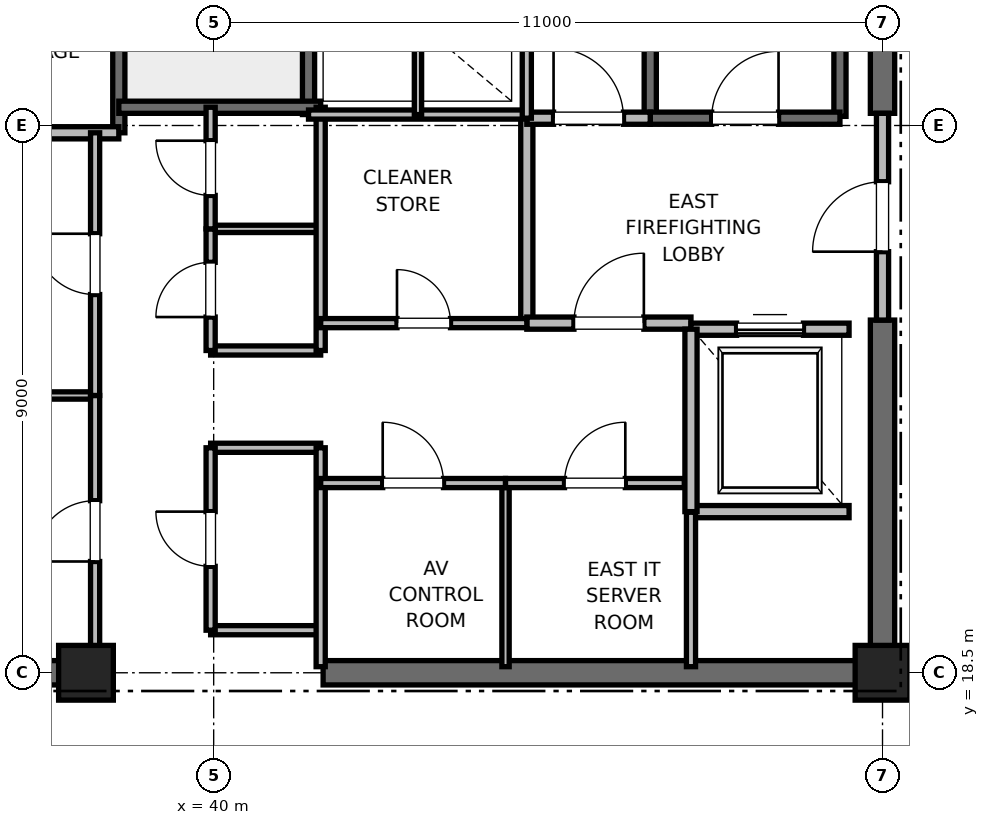
"""IFC4 building model, lengths in metres.
Left out: names, types, materials, properties, quantities, classifications, styles, units other than length and angle.
Written with IfcOpenShell. Run it as: python <this file> out.ifc"""

import sys

from ifc_helpers import new_model, si_unit, direction, frame, frame_2d, origin, origin_2d, place, context, subcontext, project, spatial, rectangle, extrude, element, fill, save


model = new_model("IFC4")
c1 = context("Model", 3, precision=1e-05, world=origin(), true_north=direction((0.0, 1.0)))
c2 = subcontext(c1, "Body", "Model", "MODEL_VIEW")
j1 = project(units=[si_unit("LENGTHUNIT", "METRE"), si_unit("PLANEANGLEUNIT", "RADIAN")], contexts=[c1])
p1 = place(None, origin())
s1 = spatial("IfcSite", under=j1, at=p1, CompositionType="ELEMENT")
p2 = place(p1, origin())
s2 = spatial("IfcBuilding", under=s1, at=p2, CompositionType="ELEMENT")
p3 = place(p2, frame((0.0, 0.0, 326.8)))
s3 = spatial("IfcBuildingStorey", under=s2, at=p3, CompositionType="ELEMENT", Elevation=326.8)
for number, where, z_axis, x_axis in (
    (1, (51.0, 18.5, 0.0), (0.0, 0.0, 1.0), (1.0, 0.0, 0.0)),
    (2, (37.9, 18.5, 0.0), (0.0, 0.0, 1.0), (1.0, 0.0, 0.0)),
):
    element("IfcColumn", number, at=place(p3, frame(where, z_axis=z_axis, x_axis=x_axis)), inside=s3, PredefinedType="PILASTER", context=c2, shape_type="SweptSolid", body=[
        extrude(rectangle(XDim=0.9, YDim=0.9, at=origin_2d()), origin(), (0.0, 0.0, 1.0), 4.0),
    ])
for number, where, z_axis, x_axis in (
    (3, (29.0, 18.5, 0.0), (0.0, 0.0, 1.0), (1.0, 0.0, 0.0)),
    (4, (41.8, 18.5, 0.0), (0.0, 0.0, 1.0), (1.0, 0.0, 0.0)),
):
    element("IfcWall", number, at=place(p3, frame(where, z_axis=z_axis, x_axis=x_axis)), inside=s3, PredefinedType="SHEAR", context=c2, shape_type="SweptSolid", body=[
        extrude(rectangle(XDim=9.2, YDim=0.4, at=frame_2d((4.6, 0.0))), origin(), (0.0, 0.0, 1.0), 3.785),
    ])
p4 = place(p3, frame((51.0, 18.5, 0.0), z_axis=(0.0, 0.0, 1.0), x_axis=(0.0, 1.0, 0.0)))
e5 = element("IfcWall", 5, at=p4, inside=s3, PredefinedType="SHEAR", context=c2, shape_type="SweptSolid", body=[
    extrude(rectangle(XDim=5.8, YDim=0.4, at=frame_2d((2.9, 0.0))), origin(), (0.0, 0.0, 1.0), 3.785),
])
p5 = place(p3, frame((51.0, 27.7, 0.0), z_axis=(0.0, 0.0, 1.0), x_axis=(0.0, 1.0, 0.0)))
e6 = element("IfcWall", 6, at=p5, inside=s3, PredefinedType="SHEAR", context=c2, shape_type="SweptSolid", body=[
    extrude(rectangle(XDim=8.8, YDim=0.4, at=frame_2d((4.4, 0.0))), origin(), (0.0, 0.0, 1.0), 3.785),
])
p6 = place(p3, frame((50.3, 27.65, 0.0), z_axis=(0.0, 0.0, 1.0), x_axis=(0.0, 1.0, 0.0)))
e7 = element("IfcWall", 7, at=p6, inside=s3, PredefinedType="SOLIDWALL", context=c2, shape_type="SweptSolid", body=[
    extrude(rectangle(XDim=8.15, YDim=0.2, at=frame_2d((4.075, 0.0))), origin(), (0.0, 0.0, 1.0), 3.785),
])
p7 = place(p3, frame((47.18, 27.62, 0.0), z_axis=(0.0, 0.0, 1.0), x_axis=(0.0, 1.0, 0.0)))
e8 = element("IfcWall", 8, at=p7, inside=s3, PredefinedType="SOLIDWALL", context=c2, shape_type="SweptSolid", body=[
    extrude(rectangle(XDim=8.18, YDim=0.2, at=frame_2d((4.09, 0.0))), origin(), (0.0, 0.0, 1.0), 3.785),
])
p8 = place(p3, frame((47.18, 27.62, 0.0), z_axis=(0.0, 0.0, 1.0), x_axis=(1.0, 0.0, 0.0)))
e9 = element("IfcWall", 9, at=p8, inside=s3, PredefinedType="SOLIDWALL", context=c2, shape_type="SweptSolid", body=[
    extrude(rectangle(XDim=3.12, YDim=0.2, at=frame_2d((1.56, 0.0))), origin(), (0.0, 0.0, 1.0), 3.785),
])
p9 = place(p8, frame((1.01, 0.0, 0.0)))
e10 = element("IfcOpeningElement", 10, at=p9, cuts=e9, PredefinedType="OPENING", context=c2, shape_type="SweptSolid", body=[
    extrude(rectangle(XDim=1.1, YDim=2.15, at=frame_2d((0.55, 1.075))), frame((0.0, 0.1, 0.0), z_axis=(0.0, -1.0, 0.0), x_axis=(1.0, 0.0, 0.0)), (0.0, 0.0, 1.0), 0.2),
])
p10 = place(p3, frame((38.44, 27.38, 0.0), z_axis=(0.0, 0.0, 1.0), x_axis=(0.0, 1.0, 0.0)))
e11 = element("IfcWall", 11, at=p10, inside=s3, PredefinedType="SOLIDWALL", context=c2, shape_type="SweptSolid", body=[
    extrude(rectangle(XDim=8.87, YDim=0.2, at=frame_2d((4.435, 0.0))), origin(), (0.0, 0.0, 1.0), 3.785),
])
p11 = place(p3, frame((41.56, 27.68, 0.0), z_axis=(0.0, 0.0, 1.0), x_axis=(0.0, 1.0, 0.0)))
e12 = element("IfcWall", 12, at=p11, inside=s3, PredefinedType="SOLIDWALL", context=c2, shape_type="SweptSolid", body=[
    extrude(rectangle(XDim=8.57, YDim=0.2, at=frame_2d((4.285, 0.0))), origin(), (0.0, 0.0, 1.0), 3.785),
])
p12 = place(p3, frame((38.44, 27.8, 0.0), z_axis=(0.0, 0.0, 1.0), x_axis=(1.0, 0.0, 0.0)))
e13 = element("IfcWall", 13, at=p12, inside=s3, PredefinedType="SOLIDWALL", context=c2, shape_type="SweptSolid", body=[
    extrude(rectangle(XDim=3.32, YDim=0.2, at=frame_2d((1.66, 0.0))), origin(), (0.0, 0.0, 1.0), 3.785),
])
p13 = place(p3, frame((32.82, 27.38, 0.0), z_axis=(0.0, 0.0, 1.0), x_axis=(1.0, 0.0, 0.0)))
e14 = element("IfcWall", 14, at=p13, inside=s3, PredefinedType="PARTITIONING", context=c2, shape_type="SweptSolid", body=[
    extrude(rectangle(XDim=5.62, YDim=0.2, at=frame_2d((2.81, 0.0))), origin(), (0.0, 0.0, 1.0), 3.785),
])
p14 = place(p3, frame((45.15, 24.25, 0.0), z_axis=(0.0, 0.0, 1.0), x_axis=(0.0, 1.0, 0.0)))
e15 = element("IfcWall", 15, at=p14, inside=s3, PredefinedType="PARTITIONING", context=c2, shape_type="SweptSolid", body=[
    extrude(rectangle(XDim=3.37, YDim=0.2, at=frame_2d((1.685, 0.0))), origin(), (0.0, 0.0, 1.0), 3.785),
])
p15 = place(p3, frame((45.15, 24.25, 0.0), z_axis=(0.0, 0.0, 1.0), x_axis=(1.0, 0.0, 0.0)))
e16 = element("IfcWall", 16, at=p15, inside=s3, PredefinedType="PARTITIONING", context=c2, shape_type="SweptSolid", body=[
    extrude(rectangle(XDim=2.7, YDim=0.2, at=frame_2d((1.35, 0.0))), origin(), (0.0, 0.0, 1.0), 3.785),
])
p16 = place(p15, frame((0.775, 0.0, 0.0)))
e17 = element("IfcOpeningElement", 17, at=p16, cuts=e16, PredefinedType="OPENING", context=c2, shape_type="SweptSolid", body=[
    extrude(rectangle(XDim=1.15, YDim=2.2, at=frame_2d((0.575, 1.1))), frame((0.0, 0.1, 0.0), z_axis=(0.0, -1.0, 0.0), x_axis=(1.0, 0.0, 0.0)), (0.0, 0.0, 1.0), 0.2),
])
p17 = place(p3, frame((45.15, 27.62, 0.0), z_axis=(0.0, 0.0, 1.0), x_axis=(1.0, 0.0, 0.0)))
e18 = element("IfcWall", 18, at=p17, inside=s3, PredefinedType="PARTITIONING", context=c2, shape_type="SweptSolid", body=[
    extrude(rectangle(XDim=2.03, YDim=0.2, at=frame_2d((1.015, 0.0))), origin(), (0.0, 0.0, 1.0), 3.785),
])
p18 = place(p17, frame((0.44, 0.0, 0.0)))
e19 = element("IfcOpeningElement", 19, at=p18, cuts=e18, PredefinedType="OPENING", context=c2, shape_type="SweptSolid", body=[
    extrude(rectangle(XDim=1.15, YDim=2.2, at=frame_2d((0.575, 1.1))), frame((0.0, 0.1, 0.0), z_axis=(0.0, -1.0, 0.0), x_axis=(1.0, 0.0, 0.0)), (0.0, 0.0, 1.0), 0.2),
])
p19 = place(p3, frame((51.0, 24.3, 0.0), z_axis=(0.0, 0.0, 1.0), x_axis=(0.0, 1.0, 0.0)))
e20 = element("IfcWall", 20, at=p19, inside=s3, PredefinedType="PARTITIONING", context=c2, shape_type="SweptSolid", body=[
    extrude(rectangle(XDim=3.4, YDim=0.2, at=frame_2d((1.7, 0.0))), origin(), (0.0, 0.0, 1.0), 2.865),
])
p20 = place(p19, frame((1.125, 0.0, 0.0)))
e21 = element("IfcOpeningElement", 21, at=p20, cuts=e20, PredefinedType="OPENING", context=c2, shape_type="SweptSolid", body=[
    extrude(rectangle(XDim=1.15, YDim=2.2, at=frame_2d((0.575, 1.1))), frame((0.0, 0.1, 0.0), z_axis=(0.0, -1.0, 0.0), x_axis=(1.0, 0.0, 0.0)), (0.0, 0.0, 1.0), 0.2),
])
p21 = place(p3, frame((47.85, 21.15, 0.0), z_axis=(0.0, 0.0, 1.0), x_axis=(1.0, 0.0, 0.0)))
e22 = element("IfcWall", 22, at=p21, inside=s3, PredefinedType="SOLIDWALL", context=c2, shape_type="SweptSolid", body=[
    extrude(rectangle(XDim=2.6, YDim=0.2, at=frame_2d((1.3, 0.0))), origin(), (0.0, 0.0, 1.0), 3.785),
])
p22 = place(p3, frame((50.45, 24.15, 0.0), z_axis=(0.0, 0.0, 1.0), x_axis=(-1.0, 0.0, 0.0)))
e23 = element("IfcWall", 23, at=p22, inside=s3, PredefinedType="SOLIDWALL", context=c2, shape_type="SweptSolid", body=[
    extrude(rectangle(XDim=2.6, YDim=0.2, at=frame_2d((1.3, 0.0))), origin(), (0.0, 0.0, 1.0), 2.865),
])
p23 = place(p22, frame((0.75, 0.0, 0.0)))
e24 = element("IfcOpeningElement", 24, at=p23, cuts=e23, PredefinedType="OPENING", context=c2, shape_type="SweptSolid", body=[
    extrude(rectangle(XDim=1.1, YDim=2.2, at=frame_2d((0.55, 1.1))), frame((0.0, 0.1, 0.0), z_axis=(0.0, -1.0, 0.0), x_axis=(1.0, 0.0, 0.0)), (0.0, 0.0, 1.0), 0.2),
])
p24 = place(p3, frame((47.85, 24.15, 0.0), z_axis=(0.0, 0.0, 1.0), x_axis=(0.0, -1.0, 0.0)))
e25 = element("IfcWall", 25, at=p24, inside=s3, PredefinedType="SOLIDWALL", context=c2, shape_type="SweptSolid", body=[
    extrude(rectangle(XDim=3.0, YDim=0.2, at=frame_2d((1.5, 0.0))), origin(), (0.0, 0.0, 1.0), 3.785),
])
for number, where, z_axis, x_axis in (
    (26, (39.95, 19.2, 0.0), (0.0, 0.0, 1.0), (1.0, 0.0, 0.0)),
    (27, (39.95, 22.2, 0.0), (0.0, 0.0, 1.0), (1.0, 0.0, 0.0)),
    (28, (39.95, 23.8, 0.0), (0.0, 0.0, 1.0), (1.0, 0.0, 0.0)),
):
    element("IfcWall", number, at=place(p3, frame(where, z_axis=z_axis, x_axis=x_axis)), inside=s3, PredefinedType="PARTITIONING", context=c2, shape_type="SweptSolid", body=[
        extrude(rectangle(XDim=1.81, YDim=0.15, at=frame_2d((0.905, 0.0))), origin(), (0.0, 0.0, 1.0), 2.85),
    ])
p25 = place(p3, frame((39.95, 25.8, 0.0), z_axis=(0.0, 0.0, 1.0), x_axis=(1.0, 0.0, 0.0)))
e29 = element("IfcWall", 29, at=p25, inside=s3, PredefinedType="PARTITIONING", context=c2, shape_type="SweptSolid", body=[
    extrude(rectangle(XDim=1.81, YDim=0.12, at=frame_2d((0.905, 0.0))), origin(), (0.0, 0.0, 1.0), 2.85),
])
p26 = place(p3, frame((41.76, 18.6, 0.0), z_axis=(0.0, 0.0, 1.0), x_axis=(0.0, 1.0, 0.0)))
e30 = element("IfcWall", 30, at=p26, inside=s3, PredefinedType="PARTITIONING", context=c2, shape_type="SweptSolid", body=[
    extrude(rectangle(XDim=3.6, YDim=0.15, at=frame_2d((1.8, 0.0))), origin(), (0.0, 0.0, 1.0), 2.85),
])
p27 = place(p3, frame((41.76, 23.8, 0.0), z_axis=(0.0, 0.0, 1.0), x_axis=(0.0, 1.0, 0.0)))
e31 = element("IfcWall", 31, at=p27, inside=s3, PredefinedType="PARTITIONING", context=c2, shape_type="SweptSolid", body=[
    extrude(rectangle(XDim=4.0, YDim=0.15, at=frame_2d((2.0, 0.0))), origin(), (0.0, 0.0, 1.0), 2.85),
])
p28 = place(p3, frame((39.95, 19.2, 0.0), z_axis=(0.0, 0.0, 1.0), x_axis=(0.0, 1.0, 0.0)))
e32 = element("IfcWall", 32, at=p28, inside=s3, PredefinedType="PARTITIONING", context=c2, shape_type="SweptSolid", body=[
    extrude(rectangle(XDim=3.0, YDim=0.15, at=frame_2d((1.5, 0.0))), origin(), (0.0, 0.0, 1.0), 2.85),
])
p29 = place(p28, frame((1.05, 0.0, 0.0)))
e33 = element("IfcOpeningElement", 33, at=p29, cuts=e32, PredefinedType="OPENING", context=c2, shape_type="SweptSolid", body=[
    extrude(rectangle(XDim=0.9, YDim=2.1, at=frame_2d((0.45, 1.05))), frame((0.0, 0.075, 0.0), z_axis=(0.0, -1.0, 0.0), x_axis=(1.0, 0.0, 0.0)), (0.0, 0.0, 1.0), 0.15),
])
p30 = place(p3, frame((39.95, 23.8, 0.0), z_axis=(0.0, 0.0, 1.0), x_axis=(0.0, 1.0, 0.0)))
e34 = element("IfcWall", 34, at=p30, inside=s3, PredefinedType="PARTITIONING", context=c2, shape_type="SweptSolid", body=[
    extrude(rectangle(XDim=2.0, YDim=0.15, at=frame_2d((1.0, 0.0))), origin(), (0.0, 0.0, 1.0), 2.85),
])
p31 = place(p30, frame((0.55, 0.0, 0.0)))
e35 = element("IfcOpeningElement", 35, at=p31, cuts=e34, PredefinedType="OPENING", context=c2, shape_type="SweptSolid", body=[
    extrude(rectangle(XDim=0.9, YDim=2.1, at=frame_2d((0.45, 1.05))), frame((0.0, 0.075, 0.0), z_axis=(0.0, -1.0, 0.0), x_axis=(1.0, 0.0, 0.0)), (0.0, 0.0, 1.0), 0.15),
])
p32 = place(p3, frame((39.95, 25.8, 0.0), z_axis=(0.0, 0.0, 1.0), x_axis=(0.0, 1.0, 0.0)))
e36 = element("IfcWall", 36, at=p32, inside=s3, PredefinedType="PARTITIONING", context=c2, shape_type="SweptSolid", body=[
    extrude(rectangle(XDim=2.0, YDim=0.15, at=frame_2d((1.0, 0.0))), origin(), (0.0, 0.0, 1.0), 2.85),
])
p33 = place(p32, frame((0.55, 0.0, 0.0)))
e37 = element("IfcOpeningElement", 37, at=p33, cuts=e36, PredefinedType="OPENING", context=c2, shape_type="SweptSolid", body=[
    extrude(rectangle(XDim=0.9, YDim=2.1, at=frame_2d((0.45, 1.05))), frame((0.0, 0.075, 0.0), z_axis=(0.0, -1.0, 0.0), x_axis=(1.0, 0.0, 0.0)), (0.0, 0.0, 1.0), 0.15),
])
p34 = place(p3, frame((32.82, 23.06, 0.0), z_axis=(0.0, 0.0, 1.0), x_axis=(1.0, 0.0, 0.0)))
e38 = element("IfcWall", 38, at=p34, inside=s3, PredefinedType="PARTITIONING", context=c2, shape_type="SweptSolid", body=[
    extrude(rectangle(XDim=5.23, YDim=0.12, at=frame_2d((2.615, 0.0))), origin(), (0.0, 0.0, 1.0), 2.85),
])
p35 = place(p3, frame((38.05, 18.6, 0.0), z_axis=(0.0, 0.0, 1.0), x_axis=(0.0, 1.0, 0.0)))
e39 = element("IfcWall", 39, at=p35, inside=s3, PredefinedType="PARTITIONING", context=c2, shape_type="SweptSolid", body=[
    extrude(rectangle(XDim=4.46, YDim=0.15, at=frame_2d((2.23, 0.0))), origin(), (0.0, 0.0, 1.0), 2.85),
])
p36 = place(p35, frame((1.73, 0.0, 0.0)))
e40 = element("IfcOpeningElement", 40, at=p36, cuts=e39, PredefinedType="OPENING", context=c2, shape_type="SweptSolid", body=[
    extrude(rectangle(XDim=1.0, YDim=2.15, at=frame_2d((0.5, 1.075))), frame((0.0, 0.075, 0.0), z_axis=(0.0, -1.0, 0.0), x_axis=(1.0, 0.0, 0.0)), (0.0, 0.0, 1.0), 0.15),
])
p37 = place(p3, frame((38.05, 23.06, 0.0), z_axis=(0.0, 0.0, 1.0), x_axis=(0.0, 1.0, 0.0)))
e41 = element("IfcWall", 41, at=p37, inside=s3, PredefinedType="PARTITIONING", context=c2, shape_type="SweptSolid", body=[
    extrude(rectangle(XDim=4.32, YDim=0.15, at=frame_2d((2.16, 0.0))), origin(), (0.0, 0.0, 1.0), 2.85),
])
p38 = place(p37, frame((1.66, 0.0, 0.0)))
e42 = element("IfcOpeningElement", 42, at=p38, cuts=e41, PredefinedType="OPENING", context=c2, shape_type="SweptSolid", body=[
    extrude(rectangle(XDim=1.0, YDim=2.15, at=frame_2d((0.5, 1.075))), frame((0.0, 0.075, 0.0), z_axis=(0.0, -1.0, 0.0), x_axis=(1.0, 0.0, 0.0)), (0.0, 0.0, 1.0), 0.15),
])
p39 = place(p3, frame((41.56, 27.68, 0.0), z_axis=(0.0, 0.0, 1.0), x_axis=(1.0, 0.0, 0.0)))
e43 = element("IfcWall", 43, at=p39, inside=s3, PredefinedType="PARTITIONING", context=c2, shape_type="SweptSolid", body=[
    extrude(rectangle(XDim=3.59, YDim=0.15, at=frame_2d((1.795, 0.0))), origin(), (0.0, 0.0, 1.0), 2.85),
])
p40 = place(p3, frame((47.85, 18.6, 0.0), z_axis=(0.0, 0.0, 1.0), x_axis=(0.0, 1.0, 0.0)))
e44 = element("IfcWall", 44, at=p40, inside=s3, PredefinedType="PARTITIONING", context=c2, shape_type="SweptSolid", body=[
    extrude(rectangle(XDim=2.54, YDim=0.15, at=frame_2d((1.27, 0.0))), origin(), (0.0, 0.0, 1.0), 2.85),
])
p41 = place(p3, frame((44.8, 18.6, 0.0), z_axis=(0.0, 0.0, 1.0), x_axis=(0.0, 1.0, 0.0)))
e45 = element("IfcWall", 45, at=p41, inside=s3, PredefinedType="PARTITIONING", context=c2, shape_type="SweptSolid", body=[
    extrude(rectangle(XDim=3.02, YDim=0.12, at=frame_2d((1.51, 0.0))), origin(), (0.0, 0.0, 1.0), 2.85),
])
p42 = place(p3, frame((41.76, 21.62, 0.0), z_axis=(0.0, 0.0, 1.0), x_axis=(1.0, 0.0, 0.0)))
e46 = element("IfcWall", 46, at=p42, inside=s3, PredefinedType="PARTITIONING", context=c2, shape_type="SweptSolid", body=[
    extrude(rectangle(XDim=3.04, YDim=0.15, at=frame_2d((1.52, 0.0))), origin(), (0.0, 0.0, 1.0), 2.85),
])
p43 = place(p42, frame((1.02, 0.0, 0.0)))
e47 = element("IfcOpeningElement", 47, at=p43, cuts=e46, PredefinedType="OPENING", context=c2, shape_type="SweptSolid", body=[
    extrude(rectangle(XDim=1.0, YDim=2.15, at=frame_2d((0.5, 1.075))), frame((0.0, 0.075, 0.0), z_axis=(0.0, -1.0, 0.0), x_axis=(1.0, 0.0, 0.0)), (0.0, 0.0, 1.0), 0.15),
])
p44 = place(p3, frame((44.8, 21.62, 0.0), z_axis=(0.0, 0.0, 1.0), x_axis=(1.0, 0.0, 0.0)))
e48 = element("IfcWall", 48, at=p44, inside=s3, PredefinedType="PARTITIONING", context=c2, shape_type="SweptSolid", body=[
    extrude(rectangle(XDim=2.94, YDim=0.15, at=frame_2d((1.47, 0.0))), origin(), (0.0, 0.0, 1.0), 2.85),
])
p45 = place(p44, frame((0.97, 0.0, 0.0)))
e49 = element("IfcOpeningElement", 49, at=p45, cuts=e48, PredefinedType="OPENING", context=c2, shape_type="SweptSolid", body=[
    extrude(rectangle(XDim=1.0, YDim=2.15, at=frame_2d((0.5, 1.075))), frame((0.0, 0.075, 0.0), z_axis=(0.0, -1.0, 0.0), x_axis=(1.0, 0.0, 0.0)), (0.0, 0.0, 1.0), 0.15),
])
p46 = place(p3, frame((41.76, 24.25, 0.0), z_axis=(0.0, 0.0, 1.0), x_axis=(1.0, 0.0, 0.0)))
e50 = element("IfcWall", 50, at=p46, inside=s3, PredefinedType="PARTITIONING", context=c2, shape_type="SweptSolid", body=[
    extrude(rectangle(XDim=3.39, YDim=0.15, at=frame_2d((1.695, 0.0))), origin(), (0.0, 0.0, 1.0), 2.85),
])
p47 = place(p46, frame((1.255, 0.0, 0.0)))
e51 = element("IfcOpeningElement", 51, at=p47, cuts=e50, PredefinedType="OPENING", context=c2, shape_type="SweptSolid", body=[
    extrude(rectangle(XDim=0.88, YDim=2.1, at=frame_2d((0.44, 1.05))), frame((0.0, 0.075, 0.0), z_axis=(0.0, -1.0, 0.0), x_axis=(1.0, 0.0, 0.0)), (0.0, 0.0, 1.0), 0.15),
])
p48 = place(p3, frame((45.15, 27.62, 0.0), z_axis=(0.0, 0.0, 1.0), x_axis=(0.0, 1.0, 0.0)))
e52 = element("IfcWall", 52, at=p48, inside=s3, PredefinedType="PARTITIONING", context=c2, shape_type="SweptSolid", body=[
    extrude(rectangle(XDim=3.1, YDim=0.15, at=frame_2d((1.55, 0.0))), origin(), (0.0, 0.0, 1.0), 2.85),
])
p49 = place(p3, frame((43.36, 27.68, 0.0), z_axis=(0.0, 0.0, 1.0), x_axis=(0.0, 1.0, 0.0)))
e53 = element("IfcWall", 53, at=p49, inside=s3, PredefinedType="PARTITIONING", context=c2, shape_type="SweptSolid", body=[
    extrude(rectangle(XDim=3.04, YDim=0.12, at=frame_2d((1.52, 0.0))), origin(), (0.0, 0.0, 1.0), 2.85),
])
p50 = place(p9, origin())
e54 = element("IfcDoor", 54, at=p50, inside=s3, OperationType="SINGLE_SWING_RIGHT", PredefinedType="DOOR", context=c2, shape_type="SweptSolid", body=[
    extrude(rectangle(XDim=1.1, YDim=2.15, at=frame_2d((0.55, 1.075))), frame((0.0, 0.025, 0.0), z_axis=(0.0, -1.0, 0.0), x_axis=(1.0, 0.0, 0.0)), (0.0, 0.0, 1.0), 0.05),
])
fill(e10, e54)
p51 = place(p16, origin())
e55 = element("IfcDoor", 55, at=p51, inside=s3, OperationType="SINGLE_SWING_RIGHT", PredefinedType="DOOR", context=c2, shape_type="SweptSolid", body=[
    extrude(rectangle(XDim=1.15, YDim=2.2, at=frame_2d((0.575, 1.1))), frame((0.0, 0.025, 0.0), z_axis=(0.0, -1.0, 0.0), x_axis=(1.0, 0.0, 0.0)), (0.0, 0.0, 1.0), 0.05),
])
fill(e17, e55)
p52 = place(p18, origin())
e56 = element("IfcDoor", 56, at=p52, inside=s3, OperationType="SINGLE_SWING_LEFT", PredefinedType="DOOR", context=c2, shape_type="SweptSolid", body=[
    extrude(rectangle(XDim=1.15, YDim=2.2, at=frame_2d((0.575, 1.1))), frame((0.0, 0.025, 0.0), z_axis=(0.0, -1.0, 0.0), x_axis=(1.0, 0.0, 0.0)), (0.0, 0.0, 1.0), 0.05),
])
fill(e19, e56)
p53 = place(p20, origin())
e57 = element("IfcDoor", 57, at=p53, inside=s3, OperationType="SINGLE_SWING_LEFT", PredefinedType="DOOR", context=c2, shape_type="SweptSolid", body=[
    extrude(rectangle(XDim=1.15, YDim=2.2, at=frame_2d((0.575, 1.1))), frame((0.0, 0.025, 0.0), z_axis=(0.0, -1.0, 0.0), x_axis=(1.0, 0.0, 0.0)), (0.0, 0.0, 1.0), 0.05),
])
fill(e21, e57)
p54 = place(p23, origin())
e58 = element("IfcDoor", 58, at=p54, inside=s3, OperationType="SLIDING_TO_RIGHT", PredefinedType="DOOR", context=c2, shape_type="SweptSolid", body=[
    extrude(rectangle(XDim=1.1, YDim=2.2, at=frame_2d((0.55, 1.1))), frame((0.0, 0.025, 0.0), z_axis=(0.0, -1.0, 0.0), x_axis=(1.0, 0.0, 0.0)), (0.0, 0.0, 1.0), 0.05),
])
fill(e24, e58)
p55 = place(p29, origin())
e59 = element("IfcDoor", 59, at=p55, inside=s3, OperationType="SINGLE_SWING_RIGHT", PredefinedType="DOOR", context=c2, shape_type="SweptSolid", body=[
    extrude(rectangle(XDim=0.9, YDim=2.1, at=frame_2d((0.45, 1.05))), frame((0.0, 0.025, 0.0), z_axis=(0.0, -1.0, 0.0), x_axis=(1.0, 0.0, 0.0)), (0.0, 0.0, 1.0), 0.05),
])
fill(e33, e59)
p56 = place(p31, origin())
e60 = element("IfcDoor", 60, at=p56, inside=s3, OperationType="SINGLE_SWING_LEFT", PredefinedType="DOOR", context=c2, shape_type="SweptSolid", body=[
    extrude(rectangle(XDim=0.9, YDim=2.1, at=frame_2d((0.45, 1.05))), frame((0.0, 0.025, 0.0), z_axis=(0.0, -1.0, 0.0), x_axis=(1.0, 0.0, 0.0)), (0.0, 0.0, 1.0), 0.05),
])
fill(e35, e60)
p57 = place(p33, origin())
e61 = element("IfcDoor", 61, at=p57, inside=s3, OperationType="SINGLE_SWING_RIGHT", PredefinedType="DOOR", context=c2, shape_type="SweptSolid", body=[
    extrude(rectangle(XDim=0.9, YDim=2.1, at=frame_2d((0.45, 1.05))), frame((0.0, 0.025, 0.0), z_axis=(0.0, -1.0, 0.0), x_axis=(1.0, 0.0, 0.0)), (0.0, 0.0, 1.0), 0.05),
])
fill(e37, e61)
p58 = place(p36, origin())
e62 = element("IfcDoor", 62, at=p58, inside=s3, OperationType="SINGLE_SWING_LEFT", PredefinedType="DOOR", context=c2, shape_type="SweptSolid", body=[
    extrude(rectangle(XDim=1.0, YDim=2.15, at=frame_2d((0.5, 1.075))), frame((0.0, 0.025, 0.0), z_axis=(0.0, -1.0, 0.0), x_axis=(1.0, 0.0, 0.0)), (0.0, 0.0, 1.0), 0.05),
])
fill(e40, e62)
p59 = place(p38, origin())
e63 = element("IfcDoor", 63, at=p59, inside=s3, OperationType="SINGLE_SWING_RIGHT", PredefinedType="DOOR", context=c2, shape_type="SweptSolid", body=[
    extrude(rectangle(XDim=1.0, YDim=2.15, at=frame_2d((0.5, 1.075))), frame((0.0, 0.025, 0.0), z_axis=(0.0, -1.0, 0.0), x_axis=(1.0, 0.0, 0.0)), (0.0, 0.0, 1.0), 0.05),
])
fill(e42, e63)
p60 = place(p43, origin())
e64 = element("IfcDoor", 64, at=p60, inside=s3, OperationType="SINGLE_SWING_LEFT", PredefinedType="DOOR", context=c2, shape_type="SweptSolid", body=[
    extrude(rectangle(XDim=1.0, YDim=2.15, at=frame_2d((0.5, 1.075))), frame((0.0, 0.025, 0.0), z_axis=(0.0, -1.0, 0.0), x_axis=(1.0, 0.0, 0.0)), (0.0, 0.0, 1.0), 0.05),
])
fill(e47, e64)
p61 = place(p45, origin())
e65 = element("IfcDoor", 65, at=p61, inside=s3, OperationType="SINGLE_SWING_RIGHT", PredefinedType="DOOR", context=c2, shape_type="SweptSolid", body=[
    extrude(rectangle(XDim=1.0, YDim=2.15, at=frame_2d((0.5, 1.075))), frame((0.0, 0.025, 0.0), z_axis=(0.0, -1.0, 0.0), x_axis=(1.0, 0.0, 0.0)), (0.0, 0.0, 1.0), 0.05),
])
fill(e49, e65)
p62 = place(p47, origin())
e66 = element("IfcDoor", 66, at=p62, inside=s3, OperationType="SINGLE_SWING_LEFT", PredefinedType="DOOR", context=c2, shape_type="SweptSolid", body=[
    extrude(rectangle(XDim=0.88, YDim=2.1, at=frame_2d((0.44, 1.05))), frame((0.0, 0.025, 0.0), z_axis=(0.0, -1.0, 0.0), x_axis=(1.0, 0.0, 0.0)), (0.0, 0.0, 1.0), 0.05),
])
fill(e51, e66)
save(model, sys.argv[1])
